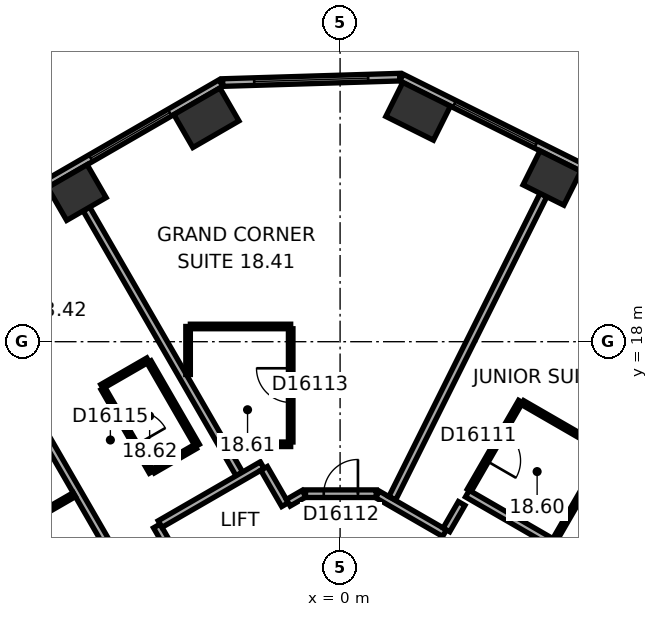
"""IFC4 building model, lengths in metres.
Left out: names, types, materials, properties, quantities, classifications, styles, units other than length and angle.
Written with IfcOpenShell. Run it as: python <this file> out.ifc"""

import sys

from ifc_helpers import new_model, si_unit, direction, frame, frame_2d, origin, origin_2d, place, context, subcontext, project, spatial, rectangle, extrude, element, fill, save


model = new_model("IFC4")
c1 = context("Model", 3, precision=1e-05, world=origin(), true_north=direction((0.0, 1.0)))
c2 = subcontext(c1, "Body", "Model", "MODEL_VIEW")
j1 = project(units=[si_unit("LENGTHUNIT", "METRE"), si_unit("PLANEANGLEUNIT", "RADIAN")], contexts=[c1])
p1 = place(None, origin())
s1 = spatial("IfcSite", under=j1, at=p1, CompositionType="ELEMENT")
p2 = place(p1, origin())
s2 = spatial("IfcBuilding", under=s1, at=p2, CompositionType="ELEMENT")
p3 = place(p2, frame((0.0, 0.0, 83.6)))
s3 = spatial("IfcBuildingStorey", under=s2, at=p3, CompositionType="ELEMENT", Elevation=83.6)
p4 = place(p3, frame((5.574, 22.306, 0.0), z_axis=(0.0, 0.0, 1.0), x_axis=(-0.894934361602, 0.44619781311, 0.0)))
e1 = element("IfcColumn", 1, at=p4, inside=s3, PredefinedType="COLUMN", context=c2, shape_type="SweptSolid", body=[
    extrude(rectangle(XDim=1.2, YDim=1.0, at=origin_2d()), origin(), (0.0, 0.0, 1.0), 3.3),
])
for number, where, z_axis, x_axis in (
    (2, (2.053, 24.062, 0.0), (0.0, 0.0, 1.0), (-0.895, 0.446, 0.0)),
    (3, (-3.518, 23.892, 0.0), (0.0, 0.0, 1.0), (-0.866, -0.5, 0.0)),
):
    element("IfcColumn", number, at=place(p3, frame(where, z_axis=z_axis, x_axis=x_axis)), inside=s3, PredefinedType="COLUMN", context=c2, shape_type="SweptSolid", body=[
        extrude(rectangle(XDim=1.4, YDim=1.0, at=origin_2d()), origin(), (0.0, 0.0, 1.0), 3.3),
    ])
p5 = place(p3, frame((-6.926, 21.925, 0.0), z_axis=(0.0, 0.0, 1.0), x_axis=(-0.866025403784, -0.5, 0.0)))
e4 = element("IfcColumn", 4, at=p5, inside=s3, PredefinedType="COLUMN", context=c2, shape_type="SweptSolid", body=[
    extrude(rectangle(XDim=1.2, YDim=1.0, at=origin_2d()), origin(), (0.0, 0.0, 1.0), 3.3),
])
p6 = place(p3, frame((20.63, 15.47, 0.0), z_axis=(0.0, 0.0, 1.0), x_axis=(-0.894934518609, 0.446197498203, 0.0)))
e5 = element("IfcWall", 5, at=p6, inside=s3, PredefinedType="STANDARD", context=c2, shape_type="SweptSolid", body=[
    extrude(rectangle(XDim=21.246, YDim=0.2, at=frame_2d((10.623, 0.0))), origin(), (0.0, 0.0, 1.0), 3.3),
])
p7 = place(p6, frame((1.553, 0.0, 0.8)))
e6 = element("IfcOpeningElement", 6, at=p7, cuts=e5, PredefinedType="OPENING", context=c2, shape_type="SweptSolid", body=[
    extrude(rectangle(XDim=2.4, YDim=1.7, at=frame_2d((1.2, 0.85))), frame((0.0, 0.11, 0.0), z_axis=(0.0, -1.0, 0.0), x_axis=(1.0, 0.0, 0.0)), (0.0, 0.0, 1.0), 0.22),
])
p8 = place(p6, frame((5.488, 0.0, 0.8)))
e7 = element("IfcOpeningElement", 7, at=p8, cuts=e5, PredefinedType="OPENING", context=c2, shape_type="SweptSolid", body=[
    extrude(rectangle(XDim=2.4, YDim=1.7, at=frame_2d((1.2, 0.85))), frame((0.0, 0.11, 0.0), z_axis=(0.0, -1.0, 0.0), x_axis=(1.0, 0.0, 0.0)), (0.0, 0.0, 1.0), 0.22),
])
p9 = place(p6, frame((9.422, 0.0, 0.8)))
e8 = element("IfcOpeningElement", 8, at=p9, cuts=e5, PredefinedType="OPENING", context=c2, shape_type="SweptSolid", body=[
    extrude(rectangle(XDim=2.4, YDim=1.7, at=frame_2d((1.2, 0.85))), frame((0.0, 0.11, 0.0), z_axis=(0.0, -1.0, 0.0), x_axis=(1.0, 0.0, 0.0)), (0.0, 0.0, 1.0), 0.22),
])
p10 = place(p6, frame((13.357, 0.0, 0.8)))
e9 = element("IfcOpeningElement", 9, at=p10, cuts=e5, PredefinedType="OPENING", context=c2, shape_type="SweptSolid", body=[
    extrude(rectangle(XDim=2.4, YDim=1.7, at=frame_2d((1.2, 0.85))), frame((0.0, 0.11, 0.0), z_axis=(0.0, -1.0, 0.0), x_axis=(1.0, 0.0, 0.0)), (0.0, 0.0, 1.0), 0.22),
])
p11 = place(p6, frame((17.292, 0.0, 0.8)))
e10 = element("IfcOpeningElement", 10, at=p11, cuts=e5, PredefinedType="OPENING", context=c2, shape_type="SweptSolid", body=[
    extrude(rectangle(XDim=2.4, YDim=1.7, at=frame_2d((1.2, 0.85))), frame((0.0, 0.11, 0.0), z_axis=(0.0, -1.0, 0.0), x_axis=(1.0, 0.0, 0.0)), (0.0, 0.0, 1.0), 0.22),
])
p12 = place(p3, frame((1.568, 24.961, 0.0), z_axis=(0.0, 0.0, 1.0), x_axis=(-0.999533359013, -0.030546099927, 0.0)))
e11 = element("IfcWall", 11, at=p12, inside=s3, PredefinedType="STANDARD", context=c2, shape_type="SweptSolid", body=[
    extrude(rectangle(XDim=4.66, YDim=0.2, at=frame_2d((2.33, 0.0))), origin(), (0.0, 0.0, 1.0), 3.3),
])
p13 = place(p12, frame((0.83, 0.0, 0.8)))
e12 = element("IfcOpeningElement", 12, at=p13, cuts=e11, PredefinedType="OPENING", context=c2, shape_type="SweptSolid", body=[
    extrude(rectangle(XDim=3.0, YDim=1.7, at=frame_2d((1.5, 0.85))), frame((0.0, 0.11, 0.0), z_axis=(0.0, -1.0, 0.0), x_axis=(1.0, 0.0, 0.0)), (0.0, 0.0, 1.0), 0.22),
])
p14 = place(p3, frame((-3.136, 24.805, 0.0), z_axis=(0.0, 0.0, 1.0), x_axis=(-0.866028291626, -0.499994998079, 0.0)))
e13 = element("IfcWall", 13, at=p14, inside=s3, PredefinedType="STANDARD", context=c2, shape_type="SweptSolid", body=[
    extrude(rectangle(XDim=21.246, YDim=0.2, at=frame_2d((10.623, 0.0))), origin(), (0.0, 0.0, 1.0), 3.3),
])
p15 = place(p14, frame((1.555, 0.0, 0.8)))
e14 = element("IfcOpeningElement", 14, at=p15, cuts=e13, PredefinedType="OPENING", context=c2, shape_type="SweptSolid", body=[
    extrude(rectangle(XDim=2.4, YDim=1.7, at=frame_2d((1.2, 0.85))), frame((0.0, 0.11, 0.0), z_axis=(0.0, -1.0, 0.0), x_axis=(1.0, 0.0, 0.0)), (0.0, 0.0, 1.0), 0.22),
])
p16 = place(p14, frame((5.489, 0.0, 0.8)))
e15 = element("IfcOpeningElement", 15, at=p16, cuts=e13, PredefinedType="OPENING", context=c2, shape_type="SweptSolid", body=[
    extrude(rectangle(XDim=2.4, YDim=1.7, at=frame_2d((1.2, 0.85))), frame((0.0, 0.11, 0.0), z_axis=(0.0, -1.0, 0.0), x_axis=(1.0, 0.0, 0.0)), (0.0, 0.0, 1.0), 0.22),
])
p17 = place(p14, frame((9.424, 0.0, 0.8)))
e16 = element("IfcOpeningElement", 16, at=p17, cuts=e13, PredefinedType="OPENING", context=c2, shape_type="SweptSolid", body=[
    extrude(rectangle(XDim=2.4, YDim=1.7, at=frame_2d((1.2, 0.85))), frame((0.0, 0.11, 0.0), z_axis=(0.0, -1.0, 0.0), x_axis=(1.0, 0.0, 0.0)), (0.0, 0.0, 1.0), 0.22),
])
p18 = place(p14, frame((13.358, 0.0, 0.8)))
e17 = element("IfcOpeningElement", 17, at=p18, cuts=e13, PredefinedType="OPENING", context=c2, shape_type="SweptSolid", body=[
    extrude(rectangle(XDim=2.4, YDim=1.7, at=frame_2d((1.2, 0.85))), frame((0.0, 0.11, 0.0), z_axis=(0.0, -1.0, 0.0), x_axis=(1.0, 0.0, 0.0)), (0.0, 0.0, 1.0), 0.22),
])
p19 = place(p14, frame((17.293, 0.0, 0.8)))
e18 = element("IfcOpeningElement", 18, at=p19, cuts=e13, PredefinedType="OPENING", context=c2, shape_type="SweptSolid", body=[
    extrude(rectangle(XDim=2.4, YDim=1.7, at=frame_2d((1.2, 0.85))), frame((0.0, 0.11, 0.0), z_axis=(0.0, -1.0, 0.0), x_axis=(1.0, 0.0, 0.0)), (0.0, 0.0, 1.0), 0.22),
])
p20 = place(p3, frame((-10.083, 19.524, 0.0), z_axis=(0.0, 0.0, 1.0), x_axis=(0.499999662836, -0.866025598446, 0.0)))
e19 = element("IfcWall", 19, at=p20, inside=s3, PredefinedType="PARTITIONING", context=c2, shape_type="SweptSolid", body=[
    extrude(rectangle(XDim=9.25, YDim=0.2, at=frame_2d((4.625, 0.0))), origin(), (0.0, 0.0, 1.0), 2.6),
])
p21 = place(p3, frame((-9.016, 12.808, 0.0), z_axis=(0.0, 0.0, 1.0), x_axis=(0.86600796803, 0.500030198396, 0.0)))
e20 = element("IfcWall", 20, at=p21, inside=s3, PredefinedType="PARTITIONING", context=c2, shape_type="SweptSolid", body=[
    extrude(rectangle(XDim=2.335, YDim=0.12, at=frame_2d((1.167, 0.0))), origin(), (0.0, 0.0, 1.0), 3.05),
])
p22 = place(p3, frame((-6.676, 21.492, 0.0), z_axis=(0.0, 0.0, 1.0), x_axis=(0.500011263043, -0.866018900966, 0.0)))
e21 = element("IfcWall", 21, at=p22, inside=s3, PredefinedType="PARTITIONING", context=c2, shape_type="SweptSolid", body=[
    extrude(rectangle(XDim=8.049, YDim=0.2, at=frame_2d((4.024, 0.0))), origin(), (0.0, 0.0, 1.0), 3.05),
])
p23 = place(p3, frame((-6.268, 16.82, 0.0), z_axis=(0.0, 0.0, 1.0), x_axis=(0.866002662425, 0.500039387122, 0.0)))
e22 = element("IfcWall", 22, at=p23, inside=s3, PredefinedType="PARTITIONING", context=c2, shape_type="SweptSolid", body=[
    extrude(rectangle(XDim=1.4, YDim=0.12, at=frame_2d((0.7, 0.0))), origin(), (0.0, 0.0, 1.0), 3.05),
])
p24 = place(p3, frame((-5.026, 17.469, 0.0), z_axis=(0.0, 0.0, 1.0), x_axis=(0.500005339912, -0.866022320763, 0.0)))
e23 = element("IfcWall", 23, at=p24, inside=s3, PredefinedType="PARTITIONING", context=c2, shape_type="SweptSolid", body=[
    extrude(rectangle(XDim=2.54, YDim=0.12, at=frame_2d((1.27, 0.0))), origin(), (0.0, 0.0, 1.0), 3.05),
])
p25 = place(p3, frame((-4.968, 14.569, 0.0), z_axis=(0.0, 0.0, 1.0), x_axis=(-0.500046963369, 0.865998287773, 0.0)))
e24 = element("IfcWall", 24, at=p25, inside=s3, PredefinedType="PARTITIONING", context=c2, shape_type="SweptSolid", body=[
    extrude(rectangle(XDim=2.54, YDim=0.12, at=frame_2d((1.27, 0.0))), origin(), (0.0, 0.0, 1.0), 3.05),
])
p26 = place(p25, frame((0.82, 0.0, 0.0)))
e25 = element("IfcOpeningElement", 25, at=p26, cuts=e24, PredefinedType="OPENING", context=c2, shape_type="SweptSolid", body=[
    extrude(rectangle(XDim=0.9, YDim=2.1, at=frame_2d((0.45, 1.05))), frame((0.0, 0.07, 0.0), z_axis=(0.0, -1.0, 0.0), x_axis=(1.0, 0.0, 0.0)), (0.0, 0.0, 1.0), 0.14),
])
p27 = place(p3, frame((-4.823, 13.152, 0.0), z_axis=(0.0, 0.0, 1.0), x_axis=(0.499986357472, -0.866033280158, 0.0)))
e26 = element("IfcWall", 26, at=p27, inside=s3, PredefinedType="PARTITIONING", context=c2, shape_type="SweptSolid", body=[
    extrude(rectangle(XDim=1.201, YDim=0.2, at=frame_2d((0.601, 0.0))), origin(), (0.0, 0.0, 1.0), 3.05),
])
p28 = place(p3, frame((-4.0, 17.137, 0.0), z_axis=(0.0, 0.0, 1.0), x_axis=(0.0, 1.0, 0.0)))
e27 = element("IfcWall", 27, at=p28, inside=s3, PredefinedType="PARTITIONING", context=c2, shape_type="SweptSolid", body=[
    extrude(rectangle(XDim=1.263, YDim=0.12, at=frame_2d((0.632, 0.0))), origin(), (0.0, 0.0, 1.0), 3.05),
])
p29 = place(p3, frame((-3.94, 18.401, 0.0), z_axis=(0.0, 0.0, 1.0), x_axis=(1.0, 0.0, 0.0)))
e28 = element("IfcWall", 28, at=p29, inside=s3, PredefinedType="PARTITIONING", context=c2, shape_type="SweptSolid", body=[
    extrude(rectangle(XDim=2.64, YDim=0.12, at=frame_2d((1.32, 0.0))), origin(), (0.0, 0.0, 1.0), 3.05),
])
p30 = place(p3, frame((-3.808, 15.239, 0.0), z_axis=(0.0, 0.0, 1.0), x_axis=(-0.866087136806, -0.499893060024, 0.0)))
e29 = element("IfcWall", 29, at=p30, inside=s3, PredefinedType="PARTITIONING", context=c2, shape_type="SweptSolid", body=[
    extrude(rectangle(XDim=1.28, YDim=0.12, at=frame_2d((0.64, 0.0))), origin(), (0.0, 0.0, 1.0), 3.05),
])
p31 = place(p3, frame((-2.05, 14.752, 0.0), z_axis=(0.0, 0.0, 1.0), x_axis=(-0.866030936828, -0.499990416364, 0.0)))
e30 = element("IfcWall", 30, at=p31, inside=s3, PredefinedType="PARTITIONING", context=c2, shape_type="SweptSolid", body=[
    extrude(rectangle(XDim=3.102, YDim=0.2, at=frame_2d((1.551, 0.0))), origin(), (0.0, 0.0, 1.0), 3.05),
])
p32 = place(p3, frame((-1.449, 13.712, 0.0), z_axis=(0.0, 0.0, 1.0), x_axis=(-0.499978356969, 0.866037899034, 0.0)))
e31 = element("IfcWall", 31, at=p32, inside=s3, PredefinedType="PARTITIONING", context=c2, shape_type="SweptSolid", body=[
    extrude(rectangle(XDim=1.101, YDim=0.2, at=frame_2d((0.551, 0.0))), origin(), (0.0, 0.0, 1.0), 3.05),
])
p33 = place(p3, frame((-1.3, 15.301, 0.0), z_axis=(0.0, 0.0, 1.0), x_axis=(-1.0, 0.0, 0.0)))
e32 = element("IfcWall", 32, at=p33, inside=s3, PredefinedType="PARTITIONING", context=c2, shape_type="SweptSolid", body=[
    extrude(rectangle(XDim=1.661, YDim=0.12, at=frame_2d((0.831, 0.0))), origin(), (0.0, 0.0, 1.0), 3.05),
])
p34 = place(p3, frame((-1.3, 18.341, 0.0), z_axis=(0.0, 0.0, 1.0), x_axis=(0.0, -1.0, 0.0)))
e33 = element("IfcWall", 33, at=p34, inside=s3, PredefinedType="PARTITIONING", context=c2, shape_type="SweptSolid", body=[
    extrude(rectangle(XDim=2.98, YDim=0.12, at=frame_2d((1.49, 0.0))), origin(), (0.0, 0.0, 1.0), 3.05),
])
p35 = place(p34, frame((1.04, 0.0, 0.0)))
e34 = element("IfcOpeningElement", 34, at=p35, cuts=e33, PredefinedType="OPENING", context=c2, shape_type="SweptSolid", body=[
    extrude(rectangle(XDim=0.9, YDim=2.1, at=frame_2d((0.45, 1.05))), frame((0.0, 0.07, 0.0), z_axis=(0.0, -1.0, 0.0), x_axis=(1.0, 0.0, 0.0)), (0.0, 0.0, 1.0), 0.14),
])
p36 = place(p3, frame((-0.95, 14.001, 0.0), z_axis=(0.0, 0.0, 1.0), x_axis=(-0.86609177584, -0.499885022602, 0.0)))
e35 = element("IfcWall", 35, at=p36, inside=s3, PredefinedType="PARTITIONING", context=c2, shape_type="SweptSolid", body=[
    extrude(rectangle(XDim=0.477, YDim=0.2, at=frame_2d((0.238, 0.0))), origin(), (0.0, 0.0, 1.0), 3.05),
])
p37 = place(p3, frame((0.95, 14.001, 0.0), z_axis=(0.0, 0.0, 1.0), x_axis=(-1.0, 0.0, 0.0)))
e36 = element("IfcWall", 36, at=p37, inside=s3, PredefinedType="PARTITIONING", context=c2, shape_type="SweptSolid", body=[
    extrude(rectangle(XDim=1.86, YDim=0.2, at=frame_2d((0.93, 0.0))), origin(), (0.0, 0.0, 1.0), 3.05),
])
p38 = place(p37, frame((0.48, 0.0, 0.0)))
e37 = element("IfcOpeningElement", 37, at=p38, cuts=e36, PredefinedType="OPENING", context=c2, shape_type="SweptSolid", body=[
    extrude(rectangle(XDim=0.9, YDim=2.1, at=frame_2d((0.45, 1.05))), frame((0.0, 0.11, 0.0), z_axis=(0.0, -1.0, 0.0), x_axis=(1.0, 0.0, 0.0)), (0.0, 0.0, 1.0), 0.22),
])
p39 = place(p3, frame((2.748, 12.962, 0.0), z_axis=(0.0, 0.0, 1.0), x_axis=(-0.866013897511, 0.50001992892, 0.0)))
e38 = element("IfcWall", 38, at=p39, inside=s3, PredefinedType="PARTITIONING", context=c2, shape_type="SweptSolid", body=[
    extrude(rectangle(XDim=2.037, YDim=0.2, at=frame_2d((1.018, 0.0))), origin(), (0.0, 0.0, 1.0), 3.05),
])
p40 = place(p3, frame((3.199, 13.743, 0.0), z_axis=(0.0, 0.0, 1.0), x_axis=(-0.500170954823, -0.865926680471, 0.0)))
e39 = element("IfcWall", 39, at=p40, inside=s3, PredefinedType="PARTITIONING", context=c2, shape_type="SweptSolid", body=[
    extrude(rectangle(XDim=0.801, YDim=0.2, at=frame_2d((0.4, 0.0))), origin(), (0.0, 0.0, 1.0), 3.05),
])
p41 = place(p3, frame((3.399, 14.089, 0.0), z_axis=(0.0, 0.0, 1.0), x_axis=(0.4999416173, 0.866059108428, 0.0)))
e40 = element("IfcWall", 40, at=p41, inside=s3, PredefinedType="PARTITIONING", context=c2, shape_type="SweptSolid", body=[
    extrude(rectangle(XDim=2.7, YDim=0.12, at=frame_2d((1.35, 0.0))), origin(), (0.0, 0.0, 1.0), 3.05),
])
p42 = place(p41, frame((0.9, 0.0, 0.0)))
e41 = element("IfcOpeningElement", 41, at=p42, cuts=e40, PredefinedType="OPENING", context=c2, shape_type="SweptSolid", body=[
    extrude(rectangle(XDim=0.9, YDim=2.1, at=frame_2d((0.45, 1.05))), frame((0.0, 0.07, 0.0), z_axis=(0.0, -1.0, 0.0), x_axis=(1.0, 0.0, 0.0)), (0.0, 0.0, 1.0), 0.14),
])
p43 = place(p3, frame((4.801, 16.397, 0.0), z_axis=(0.0, 0.0, 1.0), x_axis=(0.866022320763, -0.500005339912, 0.0)))
e42 = element("IfcWall", 42, at=p43, inside=s3, PredefinedType="PARTITIONING", context=c2, shape_type="SweptSolid", body=[
    extrude(rectangle(XDim=2.54, YDim=0.12, at=frame_2d((1.27, 0.0))), origin(), (0.0, 0.0, 1.0), 3.05),
])
p44 = place(p3, frame((5.351, 21.859, 0.0), z_axis=(0.0, 0.0, 1.0), x_axis=(-0.446205309328, -0.894930624086, 0.0)))
e43 = element("IfcWall", 43, at=p44, inside=s3, PredefinedType="PARTITIONING", context=c2, shape_type="SweptSolid", body=[
    extrude(rectangle(XDim=8.913, YDim=0.2, at=frame_2d((4.457, 0.0))), origin(), (0.0, 0.0, 1.0), 2.6),
])
p45 = place(p3, frame((6.971, 15.075, 0.0), z_axis=(0.0, 0.0, 1.0), x_axis=(-0.500007957085, -0.86602080971, 0.0)))
e44 = element("IfcWall", 44, at=p45, inside=s3, PredefinedType="PARTITIONING", context=c2, shape_type="SweptSolid", body=[
    extrude(rectangle(XDim=2.64, YDim=0.12, at=frame_2d((1.32, 0.0))), origin(), (0.0, 0.0, 1.0), 3.05),
])
p46 = place(p3, frame((10.885, 9.652, 0.0), z_axis=(0.0, 0.0, 1.0), x_axis=(-0.866033277307, 0.499986362411, 0.0)))
e45 = element("IfcWall", 45, at=p46, inside=s3, PredefinedType="PARTITIONING", context=c2, shape_type="SweptSolid", body=[
    extrude(rectangle(XDim=8.702, YDim=0.2, at=frame_2d((4.351, 0.0))), origin(), (0.0, 0.0, 1.0), 3.05),
])
p47 = place(p46, frame((3.844, 0.0, 0.0)))
e46 = element("IfcOpeningElement", 46, at=p47, cuts=e45, PredefinedType="OPENING", context=c2, shape_type="SweptSolid", body=[
    extrude(rectangle(XDim=0.9, YDim=2.1, at=frame_2d((0.45, 1.05))), frame((0.0, 0.11, 0.0), z_axis=(0.0, -1.0, 0.0), x_axis=(1.0, 0.0, 0.0)), (0.0, 0.0, 1.0), 0.22),
])
p48 = place(p11, origin())
e47 = element("IfcWindow", 47, at=p48, inside=s3, PartitioningType="SINGLE_PANEL", PredefinedType="WINDOW", context=c2, shape_type="SweptSolid", body=[
    extrude(rectangle(XDim=2.4, YDim=1.7, at=frame_2d((1.2, 0.85))), frame((0.0, 0.03, 0.0), z_axis=(0.0, -1.0, 0.0), x_axis=(1.0, 0.0, 0.0)), (0.0, 0.0, 1.0), 0.06),
])
fill(e10, e47)
p49 = place(p13, origin())
e48 = element("IfcWindow", 48, at=p49, inside=s3, PartitioningType="SINGLE_PANEL", PredefinedType="WINDOW", context=c2, shape_type="SweptSolid", body=[
    extrude(rectangle(XDim=3.0, YDim=1.7, at=frame_2d((1.5, 0.85))), frame((0.0, 0.03, 0.0), z_axis=(0.0, -1.0, 0.0), x_axis=(1.0, 0.0, 0.0)), (0.0, 0.0, 1.0), 0.06),
])
fill(e12, e48)
p50 = place(p15, origin())
e49 = element("IfcWindow", 49, at=p50, inside=s3, PartitioningType="SINGLE_PANEL", PredefinedType="WINDOW", context=c2, shape_type="SweptSolid", body=[
    extrude(rectangle(XDim=2.4, YDim=1.7, at=frame_2d((1.2, 0.85))), frame((0.0, 0.03, 0.0), z_axis=(0.0, -1.0, 0.0), x_axis=(1.0, 0.0, 0.0)), (0.0, 0.0, 1.0), 0.06),
])
fill(e14, e49)
p51 = place(p42, origin())
e50 = element("IfcDoor", 50, at=p51, inside=s3, OperationType="SINGLE_SWING_LEFT", PredefinedType="DOOR", context=c2, shape_type="SweptSolid", body=[
    extrude(rectangle(XDim=0.9, YDim=2.1, at=frame_2d((0.45, 1.05))), frame((0.0, 0.025, 0.0), z_axis=(0.0, -1.0, 0.0), x_axis=(1.0, 0.0, 0.0)), (0.0, 0.0, 1.0), 0.05),
])
fill(e41, e50)
p52 = place(p38, origin())
e51 = element("IfcDoor", 51, at=p52, inside=s3, OperationType="SINGLE_SWING_LEFT", PredefinedType="DOOR", context=c2, shape_type="SweptSolid", body=[
    extrude(rectangle(XDim=0.9, YDim=2.1, at=frame_2d((0.45, 1.05))), frame((0.0, 0.025, 0.0), z_axis=(0.0, -1.0, 0.0), x_axis=(1.0, 0.0, 0.0)), (0.0, 0.0, 1.0), 0.05),
])
fill(e37, e51)
p53 = place(p35, origin())
e52 = element("IfcDoor", 52, at=p53, inside=s3, OperationType="SINGLE_SWING_LEFT", PredefinedType="DOOR", context=c2, shape_type="SweptSolid", body=[
    extrude(rectangle(XDim=0.9, YDim=2.1, at=frame_2d((0.45, 1.05))), frame((0.0, 0.025, 0.0), z_axis=(0.0, -1.0, 0.0), x_axis=(1.0, 0.0, 0.0)), (0.0, 0.0, 1.0), 0.05),
])
fill(e34, e52)
p54 = place(p26, origin())
e53 = element("IfcDoor", 53, at=p54, inside=s3, OperationType="SINGLE_SWING_LEFT", PredefinedType="DOOR", context=c2, shape_type="SweptSolid", body=[
    extrude(rectangle(XDim=0.9, YDim=2.1, at=frame_2d((0.45, 1.05))), frame((0.0, 0.025, 0.0), z_axis=(0.0, -1.0, 0.0), x_axis=(1.0, 0.0, 0.0)), (0.0, 0.0, 1.0), 0.05),
])
fill(e25, e53)
save(model, sys.argv[1])
